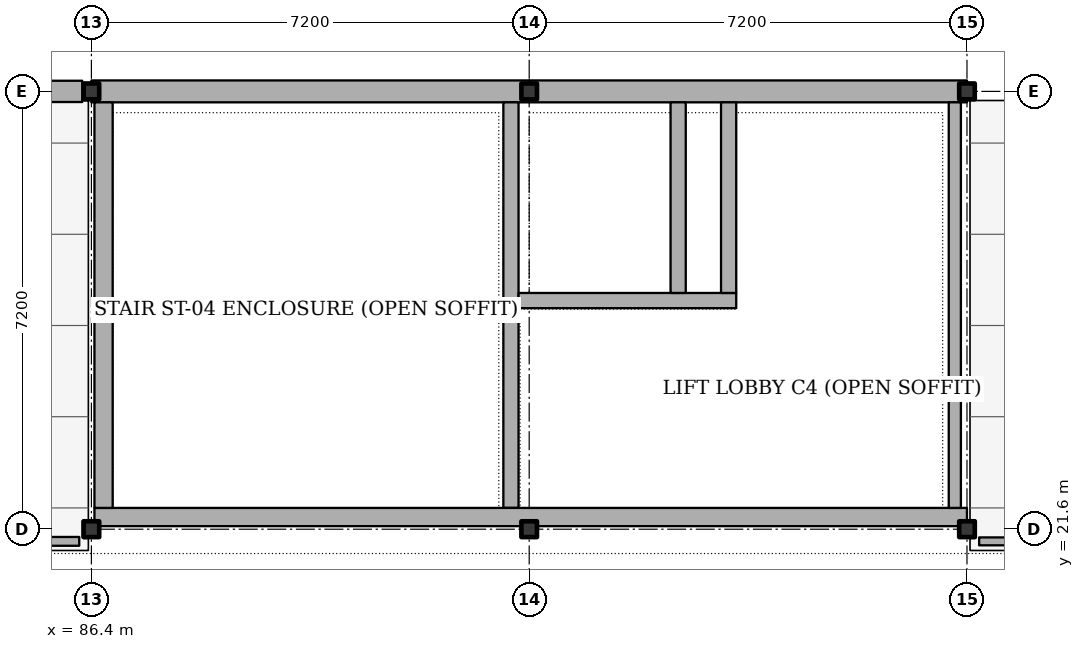
"""IFC4 building model, lengths in metres.
Left out: names, types, materials, properties, quantities, classifications, styles, units other than length and angle.
Written with IfcOpenShell. Run it as: python <this file> out.ifc"""

import sys

from ifc_helpers import new_model, si_unit, direction, frame, frame_2d, origin, origin_2d, place, context, subcontext, project, spatial, rectangle, i_section, extrude, element, fill, save


model = new_model("IFC4")
c1 = context("Model", 3, precision=1e-05, world=origin(), true_north=direction((0.0, 1.0)))
c2 = subcontext(c1, "Body", "Model", "MODEL_VIEW")
j1 = project(units=[si_unit("LENGTHUNIT", "METRE"), si_unit("PLANEANGLEUNIT", "RADIAN")], contexts=[c1])
p1 = place(None, origin())
s1 = spatial("IfcSite", under=j1, at=p1, CompositionType="ELEMENT")
p2 = place(p1, origin())
s2 = spatial("IfcBuilding", under=s1, at=p2, CompositionType="ELEMENT")
p3 = place(p2, frame((0.0, 0.0, 5.4)))
s3 = spatial("IfcBuildingStorey", under=s2, at=p3, CompositionType="ELEMENT", Elevation=5.4)
for number, where, z_axis, x_axis in (
    (1, (86.4, 21.6, 0.0), (0.0, 0.0, 1.0), (1.0, 0.0, 0.0)),
    (2, (86.4, 28.8, 0.0), (0.0, 0.0, 1.0), (1.0, 0.0, 0.0)),
    (3, (93.6, 21.6, 0.0), (0.0, 0.0, 1.0), (1.0, 0.0, 0.0)),
    (4, (93.6, 28.8, 0.0), (0.0, 0.0, 1.0), (1.0, 0.0, 0.0)),
    (5, (100.8, 21.6, 0.0), (0.0, 0.0, 1.0), (1.0, 0.0, 0.0)),
    (6, (100.8, 28.8, 0.0), (0.0, 0.0, 1.0), (1.0, 0.0, 0.0)),
):
    element("IfcColumn", number, at=place(p3, frame(where, z_axis=z_axis, x_axis=x_axis)), inside=s3, PredefinedType="COLUMN", context=c2, shape_type="SweptSolid", body=[
        extrude(i_section(OverallWidth=0.256, OverallDepth=0.26, WebThickness=0.01, FlangeThickness=0.017, FilletRadius=0.013, at=origin_2d()), origin(), (0.0, 0.0, 1.0), 4.5),
    ])
p4 = place(p3, frame((79.35, 28.8, 0.0), z_axis=(0.0, 0.0, 1.0), x_axis=(1.0, 0.0, 0.0)))
e7 = element("IfcWall", 7, at=p4, inside=s3, PredefinedType="SOLIDWALL", context=c2, shape_type="SweptSolid", body=[
    extrude(rectangle(XDim=6.9, YDim=0.35, at=frame_2d((3.45, 0.0))), origin(), (0.0, 0.0, 1.0), 3.468),
])
p5 = place(p4, frame((2.575, 0.0, 1.05)))
e8 = element("IfcOpeningElement", 8, at=p5, cuts=e7, PredefinedType="OPENING", context=c2, shape_type="SweptSolid", body=[
    extrude(rectangle(XDim=1.75, YDim=1.85, at=frame_2d((0.875, 0.925))), frame((0.0, 0.185, 0.0), z_axis=(0.0, -1.0, 0.0), x_axis=(1.0, 0.0, 0.0)), (0.0, 0.0, 1.0), 0.37),
])
p6 = place(p3, frame((86.4, 28.8, 0.0), z_axis=(0.0, 0.0, 1.0), x_axis=(1.0, 0.0, 0.0)))
e9 = element("IfcWall", 9, at=p6, inside=s3, PredefinedType="SHEAR", context=c2, shape_type="SweptSolid", body=[
    extrude(rectangle(XDim=7.2, YDim=0.36, at=frame_2d((3.6, 0.0))), origin(), (0.0, 0.0, 1.0), 3.58),
])
p7 = place(p3, frame((93.6, 28.8, 0.0), z_axis=(0.0, 0.0, 1.0), x_axis=(1.0, 0.0, 0.0)))
e10 = element("IfcWall", 10, at=p7, inside=s3, PredefinedType="SHEAR", context=c2, shape_type="SweptSolid", body=[
    extrude(rectangle(XDim=7.2, YDim=0.36, at=frame_2d((3.6, 0.0))), origin(), (0.0, 0.0, 1.0), 3.43),
])
p8 = place(p3, frame((93.3, 21.95, 0.0), z_axis=(0.0, 0.0, 1.0), x_axis=(0.0, 1.0, 0.0)))
e11 = element("IfcWall", 11, at=p8, inside=s3, PredefinedType="SHEAR", context=c2, shape_type="SweptSolid", body=[
    extrude(rectangle(XDim=6.67, YDim=0.25, at=frame_2d((3.335, 0.0))), origin(), (0.0, 0.0, 1.0), 3.55),
])
p9 = place(p8, frame((0.95, 0.0, 0.0)))
e12 = element("IfcOpeningElement", 12, at=p9, cuts=e11, PredefinedType="OPENING", context=c2, shape_type="SweptSolid", body=[
    extrude(rectangle(XDim=1.35, YDim=2.15, at=frame_2d((0.675, 1.075))), frame((0.0, 0.135, 0.0), z_axis=(0.0, -1.0, 0.0), x_axis=(1.0, 0.0, 0.0)), (0.0, 0.0, 1.0), 0.27),
])
p10 = place(p3, frame((93.425, 25.36, 0.0), z_axis=(0.0, 0.0, 1.0), x_axis=(1.0, 0.0, 0.0)))
e13 = element("IfcWall", 13, at=p10, inside=s3, PredefinedType="SHEAR", context=c2, shape_type="SweptSolid", body=[
    extrude(rectangle(XDim=3.58, YDim=0.25, at=frame_2d((1.79, 0.0))), origin(), (0.0, 0.0, 1.0), 3.55),
])
p11 = place(p10, frame((0.775, 0.0, 0.0)))
e14 = element("IfcOpeningElement", 14, at=p11, cuts=e13, PredefinedType="OPENING", context=c2, shape_type="SweptSolid", body=[
    extrude(rectangle(XDim=1.1, YDim=2.15, at=frame_2d((0.55, 1.075))), frame((0.0, 0.135, 0.0), z_axis=(0.0, -1.0, 0.0), x_axis=(1.0, 0.0, 0.0)), (0.0, 0.0, 1.0), 0.27),
])
p12 = place(p3, frame((96.05, 25.485, 0.0), z_axis=(0.0, 0.0, 1.0), x_axis=(0.0, 1.0, 0.0)))
e15 = element("IfcWall", 15, at=p12, inside=s3, PredefinedType="SHEAR", context=c2, shape_type="SweptSolid", body=[
    extrude(rectangle(XDim=3.135, YDim=0.25, at=frame_2d((1.567, 0.0))), origin(), (0.0, 0.0, 1.0), 3.55),
])
p13 = place(p3, frame((96.88, 25.485, 0.0), z_axis=(0.0, 0.0, 1.0), x_axis=(0.0, 1.0, 0.0)))
e16 = element("IfcWall", 16, at=p13, inside=s3, PredefinedType="SHEAR", context=c2, shape_type="SweptSolid", body=[
    extrude(rectangle(XDim=3.135, YDim=0.25, at=frame_2d((1.567, 0.0))), origin(), (0.0, 0.0, 1.0), 3.55),
])
p14 = place(p13, frame((0.9, 0.0, 0.0)))
e17 = element("IfcOpeningElement", 17, at=p14, cuts=e16, PredefinedType="OPENING", context=c2, shape_type="SweptSolid", body=[
    extrude(rectangle(XDim=0.92, YDim=2.05, at=frame_2d((0.46, 1.025))), frame((0.0, 0.135, 0.0), z_axis=(0.0, -1.0, 0.0), x_axis=(1.0, 0.0, 0.0)), (0.0, 0.0, 1.0), 0.27),
])
p15 = place(p3, frame((86.45, 21.8, 0.0), z_axis=(0.0, 0.0, 1.0), x_axis=(1.0, 0.0, 0.0)))
e18 = element("IfcWall", 18, at=p15, inside=s3, PredefinedType="SHEAR", context=c2, shape_type="SweptSolid", body=[
    extrude(rectangle(XDim=14.35, YDim=0.3, at=frame_2d((7.175, 0.0))), origin(), (0.0, 0.0, 1.0), 3.55),
])
p16 = place(p15, frame((11.5, 0.0, 0.0)))
e19 = element("IfcOpeningElement", 19, at=p16, cuts=e18, PredefinedType="OPENING", context=c2, shape_type="SweptSolid", body=[
    extrude(rectangle(XDim=1.5, YDim=2.15, at=frame_2d((0.75, 1.075))), frame((0.0, 0.16, 0.0), z_axis=(0.0, -1.0, 0.0), x_axis=(1.0, 0.0, 0.0)), (0.0, 0.0, 1.0), 0.32),
])
p17 = place(p3, frame((86.6, 21.95, 0.0), z_axis=(0.0, 0.0, 1.0), x_axis=(0.0, 1.0, 0.0)))
e20 = element("IfcWall", 20, at=p17, inside=s3, PredefinedType="SHEAR", context=c2, shape_type="SweptSolid", body=[
    extrude(rectangle(XDim=6.67, YDim=0.3, at=frame_2d((3.335, 0.0))), origin(), (0.0, 0.0, 1.0), 3.55),
])
p18 = place(p3, frame((100.6, 21.95, 0.0), z_axis=(0.0, 0.0, 1.0), x_axis=(0.0, 1.0, 0.0)))
e21 = element("IfcWall", 21, at=p18, inside=s3, PredefinedType="SOLIDWALL", context=c2, shape_type="SweptSolid", body=[
    extrude(rectangle(XDim=6.67, YDim=0.2, at=frame_2d((3.335, 0.0))), origin(), (0.0, 0.0, 1.0), 3.425),
])
p19 = place(p3, frame((79.33, 21.4, 0.0), z_axis=(0.0, 0.0, 1.0), x_axis=(1.0, 0.0, 0.0)))
e22 = element("IfcWall", 22, at=p19, inside=s3, PredefinedType="PARTITIONING", context=c2, shape_type="SweptSolid", body=[
    extrude(rectangle(XDim=6.87, YDim=0.145, at=frame_2d((3.435, 0.0))), origin(), (0.0, 0.0, 1.0), 3.55),
])
p20 = place(p3, frame((101.0, 21.4, 0.0), z_axis=(0.0, 0.0, 1.0), x_axis=(1.0, 0.0, 0.0)))
e23 = element("IfcWall", 23, at=p20, inside=s3, PredefinedType="PARTITIONING", context=c2, shape_type="SweptSolid", body=[
    extrude(rectangle(XDim=45.2, YDim=0.13, at=frame_2d((22.6, 0.0))), origin(), (0.0, 0.0, 1.0), 3.55),
])
p21 = place(p20, frame((16.43, 0.0, 0.0)))
e24 = element("IfcOpeningElement", 24, at=p21, cuts=e23, PredefinedType="OPENING", context=c2, shape_type="SweptSolid", body=[
    extrude(rectangle(XDim=1.6, YDim=2.2, at=frame_2d((0.8, 1.1))), frame((0.0, 0.075, 0.0), z_axis=(0.0, -1.0, 0.0), x_axis=(1.0, 0.0, 0.0)), (0.0, 0.0, 1.0), 0.15),
])
p22 = place(p9, origin())
e25 = element("IfcDoor", 25, at=p22, inside=s3, OperationType="SINGLE_SWING_LEFT", PredefinedType="DOOR", context=c2, shape_type="SweptSolid", body=[
    extrude(rectangle(XDim=1.35, YDim=2.15, at=frame_2d((0.675, 1.075))), frame((0.0, 0.025, 0.0), z_axis=(0.0, -1.0, 0.0), x_axis=(1.0, 0.0, 0.0)), (0.0, 0.0, 1.0), 0.05),
])
fill(e12, e25)
p23 = place(p11, origin())
e26 = element("IfcDoor", 26, at=p23, inside=s3, OperationType="SLIDING_TO_LEFT", PredefinedType="DOOR", context=c2, shape_type="SweptSolid", body=[
    extrude(rectangle(XDim=1.1, YDim=2.15, at=frame_2d((0.55, 1.075))), frame((0.0, 0.025, 0.0), z_axis=(0.0, -1.0, 0.0), x_axis=(1.0, 0.0, 0.0)), (0.0, 0.0, 1.0), 0.05),
])
fill(e14, e26)
p24 = place(p14, origin())
e27 = element("IfcDoor", 27, at=p24, inside=s3, OperationType="SINGLE_SWING_RIGHT", PredefinedType="DOOR", context=c2, shape_type="SweptSolid", body=[
    extrude(rectangle(XDim=0.92, YDim=2.05, at=frame_2d((0.46, 1.025))), frame((0.0, 0.025, 0.0), z_axis=(0.0, -1.0, 0.0), x_axis=(1.0, 0.0, 0.0)), (0.0, 0.0, 1.0), 0.05),
])
fill(e17, e27)
p25 = place(p16, origin())
e28 = element("IfcDoor", 28, at=p25, inside=s3, OperationType="SINGLE_SWING_LEFT", PredefinedType="DOOR", context=c2, shape_type="SweptSolid", body=[
    extrude(rectangle(XDim=1.5, YDim=2.15, at=frame_2d((0.75, 1.075))), frame((0.0, 0.025, 0.0), z_axis=(0.0, -1.0, 0.0), x_axis=(1.0, 0.0, 0.0)), (0.0, 0.0, 1.0), 0.05),
])
fill(e19, e28)
save(model, sys.argv[1])
